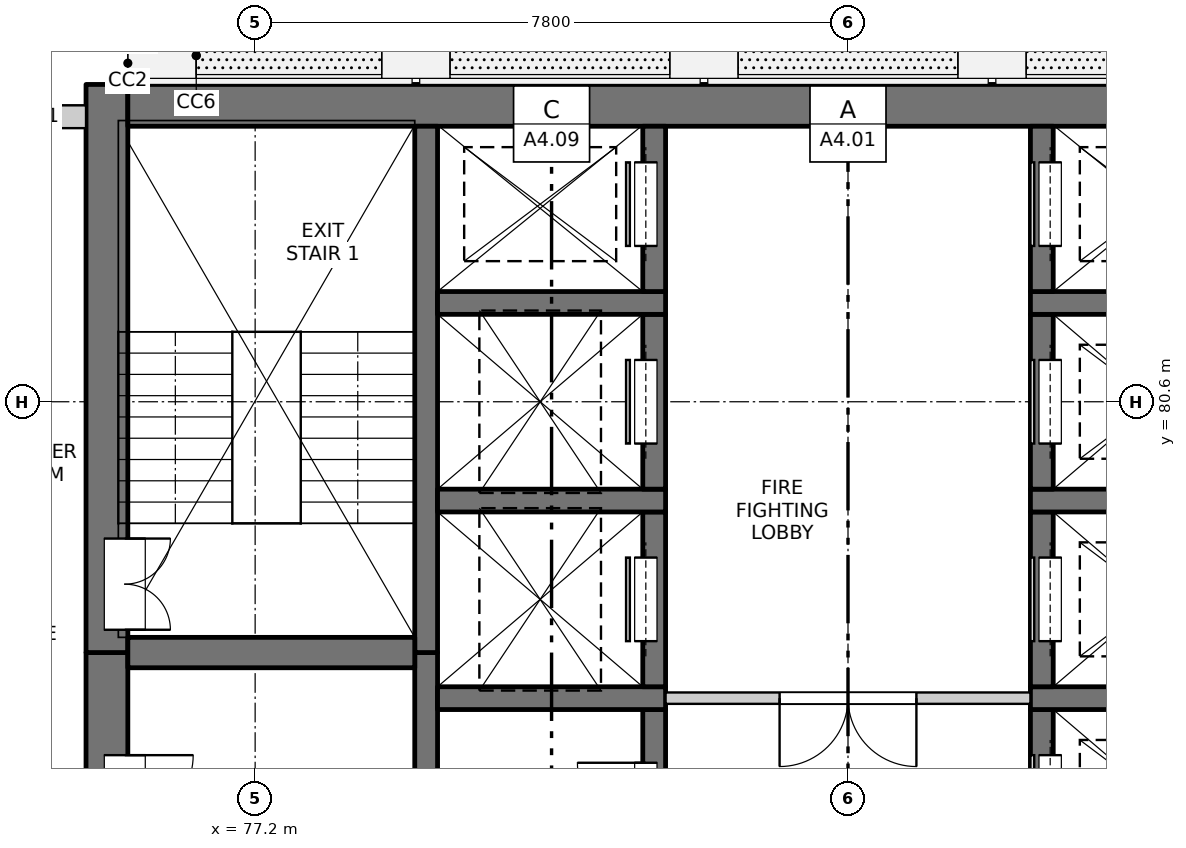
"""IFC4 building model, lengths in metres.
Left out: names, types, materials, properties, quantities, classifications, styles, units other than length and angle.
Written with IfcOpenShell. Run it as: python <this file> out.ifc"""

import sys

from ifc_helpers import new_model, si_unit, direction, frame, frame_2d, origin, place, context, subcontext, project, spatial, rectangle, extrude, element, fill, save


model = new_model("IFC4")
c1 = context("Model", 3, precision=1e-05, world=origin(), true_north=direction((0.0, 1.0)))
c2 = subcontext(c1, "Body", "Model", "MODEL_VIEW")
j1 = project(units=[si_unit("LENGTHUNIT", "METRE"), si_unit("PLANEANGLEUNIT", "RADIAN")], contexts=[c1])
p1 = place(None, origin())
s1 = spatial("IfcSite", under=j1, at=p1, CompositionType="ELEMENT")
p2 = place(p1, origin())
s2 = spatial("IfcBuilding", under=s1, at=p2, CompositionType="ELEMENT")
p3 = place(p2, frame((0.0, 0.0, 148.6)))
s3 = spatial("IfcBuildingStorey", under=s2, at=p3, CompositionType="ELEMENT", Elevation=148.6)
p4 = place(p3, frame((75.25, 54.975, -0.3), z_axis=(0.0, 0.0, 1.0), x_axis=(0.0, 1.0, 0.0)))
e1 = element("IfcWall", 1, at=p4, inside=s3, PredefinedType="SOLIDWALL", context=c2, shape_type="SweptSolid", body=[
    extrude(rectangle(XDim=22.325, YDim=0.55, at=frame_2d((11.163, 0.0))), origin(), (0.0, 0.0, 1.0), 3.45),
])
p5 = place(p4, frame((7.475, 0.0, 0.3)))
e2 = element("IfcOpeningElement", 2, at=p5, cuts=e1, PredefinedType="OPENING", context=c2, shape_type="SweptSolid", body=[
    extrude(rectangle(XDim=0.9, YDim=2.1, at=frame_2d((0.45, 1.05))), frame((0.0, 0.285, 0.0), z_axis=(0.0, -1.0, 0.0), x_axis=(1.0, 0.0, 0.0)), (0.0, 0.0, 1.0), 0.57),
])
p6 = place(p4, frame((13.775, 0.0, 0.3)))
e3 = element("IfcOpeningElement", 3, at=p6, cuts=e1, PredefinedType="OPENING", context=c2, shape_type="SweptSolid", body=[
    extrude(rectangle(XDim=0.9, YDim=2.1, at=frame_2d((0.45, 1.05))), frame((0.0, 0.285, 0.0), z_axis=(0.0, -1.0, 0.0), x_axis=(1.0, 0.0, 0.0)), (0.0, 0.0, 1.0), 0.57),
])
p7 = place(p4, frame((20.075, 0.0, 0.3)))
e4 = element("IfcOpeningElement", 4, at=p7, cuts=e1, PredefinedType="OPENING", context=c2, shape_type="SweptSolid", body=[
    extrude(rectangle(XDim=0.9, YDim=2.1, at=frame_2d((0.45, 1.05))), frame((0.0, 0.285, 0.0), z_axis=(0.0, -1.0, 0.0), x_axis=(1.0, 0.0, 0.0)), (0.0, 0.0, 1.0), 0.57),
])
p8 = place(p3, frame((75.25, 77.3, -0.3), z_axis=(0.0, 0.0, 1.0), x_axis=(0.0, 1.0, 0.0)))
e5 = element("IfcWall", 5, at=p8, inside=s3, PredefinedType="SOLIDWALL", context=c2, shape_type="SweptSolid", body=[
    extrude(rectangle(XDim=7.475, YDim=0.55, at=frame_2d((3.737, 0.0))), origin(), (0.0, 0.0, 1.0), 3.45),
])
p9 = place(p8, frame((0.3, 0.0, 0.3)))
e6 = element("IfcOpeningElement", 6, at=p9, cuts=e5, PredefinedType="OPENING", context=c2, shape_type="SweptSolid", body=[
    extrude(rectangle(XDim=1.2, YDim=2.1, at=frame_2d((0.6, 1.05))), frame((0.0, 0.285, 0.0), z_axis=(0.0, -1.0, 0.0), x_axis=(1.0, 0.0, 0.0)), (0.0, 0.0, 1.0), 0.57),
])
p10 = place(p3, frame((75.525, 84.5, -0.3), z_axis=(0.0, 0.0, 1.0), x_axis=(1.0, 0.0, 0.0)))
e7 = element("IfcWall", 7, at=p10, inside=s3, PredefinedType="SOLIDWALL", context=c2, shape_type="SweptSolid", body=[
    extrude(rectangle(XDim=18.95, YDim=0.55, at=frame_2d((9.475, 0.0))), origin(), (0.0, 0.0, 1.0), 3.45),
])
p11 = place(p3, frame((79.45, 60.95, -0.3), z_axis=(0.0, 0.0, 1.0), x_axis=(0.0, 1.0, 0.0)))
e8 = element("IfcWall", 8, at=p11, inside=s3, PredefinedType="SOLIDWALL", context=c2, shape_type="SweptSolid", body=[
    extrude(rectangle(XDim=16.35, YDim=0.3, at=frame_2d((8.175, 0.0))), origin(), (0.0, 0.0, 1.0), 3.45),
])
p12 = place(p3, frame((79.45, 77.3, -0.3), z_axis=(0.0, 0.0, 1.0), x_axis=(0.0, 1.0, 0.0)))
e9 = element("IfcWall", 9, at=p12, inside=s3, PredefinedType="SOLIDWALL", context=c2, shape_type="SweptSolid", body=[
    extrude(rectangle(XDim=6.925, YDim=0.3, at=frame_2d((3.462, 0.0))), origin(), (0.0, 0.0, 1.0), 3.45),
])
p13 = place(p3, frame((82.45, 74.25, -0.3), z_axis=(0.0, 0.0, 1.0), x_axis=(0.0, 1.0, 0.0)))
e10 = element("IfcWall", 10, at=p13, inside=s3, PredefinedType="SOLIDWALL", context=c2, shape_type="SweptSolid", body=[
    extrude(rectangle(XDim=2.3, YDim=0.3, at=frame_2d((1.15, 0.0))), origin(), (0.0, 0.0, 1.0), 3.45),
])
p14 = place(p13, frame((0.7, 0.0, 0.3)))
e11 = element("IfcOpeningElement", 11, at=p14, cuts=e10, PredefinedType="OPENING", context=c2, shape_type="SweptSolid", body=[
    extrude(rectangle(XDim=0.9, YDim=2.1, at=frame_2d((0.45, 1.05))), frame((0.0, 0.16, 0.0), z_axis=(0.0, -1.0, 0.0), x_axis=(1.0, 0.0, 0.0)), (0.0, 0.0, 1.0), 0.32),
])
p15 = place(p3, frame((79.6, 76.7, -0.3), z_axis=(0.0, 0.0, 1.0), x_axis=(1.0, 0.0, 0.0)))
e12 = element("IfcWall", 12, at=p15, inside=s3, PredefinedType="SOLIDWALL", context=c2, shape_type="SweptSolid", body=[
    extrude(rectangle(XDim=3.0, YDim=0.3, at=frame_2d((1.5, 0.0))), origin(), (0.0, 0.0, 1.0), 3.45),
])
p16 = place(p3, frame((82.45, 76.85, -0.3), z_axis=(0.0, 0.0, 1.0), x_axis=(0.0, 1.0, 0.0)))
e13 = element("IfcWall", 13, at=p16, inside=s3, PredefinedType="SOLIDWALL", context=c2, shape_type="SweptSolid", body=[
    extrude(rectangle(XDim=2.3, YDim=0.3, at=frame_2d((1.15, 0.0))), origin(), (0.0, 0.0, 1.0), 3.45),
])
p17 = place(p16, frame((0.6, 0.0, 0.3)))
e14 = element("IfcOpeningElement", 14, at=p17, cuts=e13, PredefinedType="OPENING", context=c2, shape_type="SweptSolid", body=[
    extrude(rectangle(XDim=1.1, YDim=2.1, at=frame_2d((0.55, 1.05))), frame((0.0, 0.16, 0.0), z_axis=(0.0, -1.0, 0.0), x_axis=(1.0, 0.0, 0.0)), (0.0, 0.0, 1.0), 0.32),
])
p18 = place(p3, frame((79.6, 79.3, -0.3), z_axis=(0.0, 0.0, 1.0), x_axis=(1.0, 0.0, 0.0)))
e15 = element("IfcWall", 15, at=p18, inside=s3, PredefinedType="SOLIDWALL", context=c2, shape_type="SweptSolid", body=[
    extrude(rectangle(XDim=3.0, YDim=0.3, at=frame_2d((1.5, 0.0))), origin(), (0.0, 0.0, 1.0), 3.45),
])
p19 = place(p3, frame((82.45, 79.45, -0.3), z_axis=(0.0, 0.0, 1.0), x_axis=(0.0, 1.0, 0.0)))
e16 = element("IfcWall", 16, at=p19, inside=s3, PredefinedType="SOLIDWALL", context=c2, shape_type="SweptSolid", body=[
    extrude(rectangle(XDim=2.3, YDim=0.3, at=frame_2d((1.15, 0.0))), origin(), (0.0, 0.0, 1.0), 3.45),
])
p20 = place(p19, frame((0.6, 0.0, 0.3)))
e17 = element("IfcOpeningElement", 17, at=p20, cuts=e16, PredefinedType="OPENING", context=c2, shape_type="SweptSolid", body=[
    extrude(rectangle(XDim=1.1, YDim=2.1, at=frame_2d((0.55, 1.05))), frame((0.0, 0.16, 0.0), z_axis=(0.0, -1.0, 0.0), x_axis=(1.0, 0.0, 0.0)), (0.0, 0.0, 1.0), 0.32),
])
p21 = place(p3, frame((79.6, 81.9, -0.3), z_axis=(0.0, 0.0, 1.0), x_axis=(1.0, 0.0, 0.0)))
e18 = element("IfcWall", 18, at=p21, inside=s3, PredefinedType="SOLIDWALL", context=c2, shape_type="SweptSolid", body=[
    extrude(rectangle(XDim=3.0, YDim=0.3, at=frame_2d((1.5, 0.0))), origin(), (0.0, 0.0, 1.0), 3.45),
])
p22 = place(p3, frame((82.45, 82.05, -0.3), z_axis=(0.0, 0.0, 1.0), x_axis=(0.0, 1.0, 0.0)))
e19 = element("IfcWall", 19, at=p22, inside=s3, PredefinedType="SOLIDWALL", context=c2, shape_type="SweptSolid", body=[
    extrude(rectangle(XDim=2.175, YDim=0.3, at=frame_2d((1.087, 0.0))), origin(), (0.0, 0.0, 1.0), 3.45),
])
p23 = place(p22, frame((0.6, 0.0, 0.3)))
e20 = element("IfcOpeningElement", 20, at=p23, cuts=e19, PredefinedType="OPENING", context=c2, shape_type="SweptSolid", body=[
    extrude(rectangle(XDim=1.1, YDim=2.1, at=frame_2d((0.55, 1.05))), frame((0.0, 0.16, 0.0), z_axis=(0.0, -1.0, 0.0), x_axis=(1.0, 0.0, 0.0)), (0.0, 0.0, 1.0), 0.32),
])
p24 = place(p3, frame((87.55, 74.25, -0.3), z_axis=(0.0, 0.0, 1.0), x_axis=(0.0, 1.0, 0.0)))
e21 = element("IfcWall", 21, at=p24, inside=s3, PredefinedType="SOLIDWALL", context=c2, shape_type="SweptSolid", body=[
    extrude(rectangle(XDim=2.3, YDim=0.3, at=frame_2d((1.15, 0.0))), origin(), (0.0, 0.0, 1.0), 3.45),
])
p25 = place(p24, frame((0.6, 0.0, 0.3)))
e22 = element("IfcOpeningElement", 22, at=p25, cuts=e21, PredefinedType="OPENING", context=c2, shape_type="SweptSolid", body=[
    extrude(rectangle(XDim=1.1, YDim=2.1, at=frame_2d((0.55, 1.05))), frame((0.0, 0.16, 0.0), z_axis=(0.0, -1.0, 0.0), x_axis=(1.0, 0.0, 0.0)), (0.0, 0.0, 1.0), 0.32),
])
p26 = place(p3, frame((87.4, 76.7, -0.3), z_axis=(0.0, 0.0, 1.0), x_axis=(1.0, 0.0, 0.0)))
e23 = element("IfcWall", 23, at=p26, inside=s3, PredefinedType="SOLIDWALL", context=c2, shape_type="SweptSolid", body=[
    extrude(rectangle(XDim=3.0, YDim=0.3, at=frame_2d((1.5, 0.0))), origin(), (0.0, 0.0, 1.0), 3.45),
])
p27 = place(p3, frame((87.55, 76.85, -0.3), z_axis=(0.0, 0.0, 1.0), x_axis=(0.0, 1.0, 0.0)))
e24 = element("IfcWall", 24, at=p27, inside=s3, PredefinedType="SOLIDWALL", context=c2, shape_type="SweptSolid", body=[
    extrude(rectangle(XDim=2.3, YDim=0.3, at=frame_2d((1.15, 0.0))), origin(), (0.0, 0.0, 1.0), 3.45),
])
p28 = place(p27, frame((0.6, 0.0, 0.3)))
e25 = element("IfcOpeningElement", 25, at=p28, cuts=e24, PredefinedType="OPENING", context=c2, shape_type="SweptSolid", body=[
    extrude(rectangle(XDim=1.1, YDim=2.1, at=frame_2d((0.55, 1.05))), frame((0.0, 0.16, 0.0), z_axis=(0.0, -1.0, 0.0), x_axis=(1.0, 0.0, 0.0)), (0.0, 0.0, 1.0), 0.32),
])
p29 = place(p3, frame((87.4, 79.3, -0.3), z_axis=(0.0, 0.0, 1.0), x_axis=(1.0, 0.0, 0.0)))
e26 = element("IfcWall", 26, at=p29, inside=s3, PredefinedType="SOLIDWALL", context=c2, shape_type="SweptSolid", body=[
    extrude(rectangle(XDim=3.0, YDim=0.3, at=frame_2d((1.5, 0.0))), origin(), (0.0, 0.0, 1.0), 3.45),
])
p30 = place(p3, frame((87.55, 79.45, -0.3), z_axis=(0.0, 0.0, 1.0), x_axis=(0.0, 1.0, 0.0)))
e27 = element("IfcWall", 27, at=p30, inside=s3, PredefinedType="SOLIDWALL", context=c2, shape_type="SweptSolid", body=[
    extrude(rectangle(XDim=2.3, YDim=0.3, at=frame_2d((1.15, 0.0))), origin(), (0.0, 0.0, 1.0), 3.45),
])
p31 = place(p30, frame((0.6, 0.0, 0.3)))
e28 = element("IfcOpeningElement", 28, at=p31, cuts=e27, PredefinedType="OPENING", context=c2, shape_type="SweptSolid", body=[
    extrude(rectangle(XDim=1.1, YDim=2.1, at=frame_2d((0.55, 1.05))), frame((0.0, 0.16, 0.0), z_axis=(0.0, -1.0, 0.0), x_axis=(1.0, 0.0, 0.0)), (0.0, 0.0, 1.0), 0.32),
])
p32 = place(p3, frame((87.4, 81.9, -0.3), z_axis=(0.0, 0.0, 1.0), x_axis=(1.0, 0.0, 0.0)))
e29 = element("IfcWall", 29, at=p32, inside=s3, PredefinedType="SOLIDWALL", context=c2, shape_type="SweptSolid", body=[
    extrude(rectangle(XDim=3.0, YDim=0.3, at=frame_2d((1.5, 0.0))), origin(), (0.0, 0.0, 1.0), 3.45),
])
p33 = place(p3, frame((87.55, 82.05, -0.3), z_axis=(0.0, 0.0, 1.0), x_axis=(0.0, 1.0, 0.0)))
e30 = element("IfcWall", 30, at=p33, inside=s3, PredefinedType="SOLIDWALL", context=c2, shape_type="SweptSolid", body=[
    extrude(rectangle(XDim=2.175, YDim=0.3, at=frame_2d((1.087, 0.0))), origin(), (0.0, 0.0, 1.0), 3.45),
])
p34 = place(p33, frame((0.6, 0.0, 0.3)))
e31 = element("IfcOpeningElement", 31, at=p34, cuts=e30, PredefinedType="OPENING", context=c2, shape_type="SweptSolid", body=[
    extrude(rectangle(XDim=1.1, YDim=2.1, at=frame_2d((0.55, 1.05))), frame((0.0, 0.16, 0.0), z_axis=(0.0, -1.0, 0.0), x_axis=(1.0, 0.0, 0.0)), (0.0, 0.0, 1.0), 0.32),
])
p35 = place(p3, frame((75.525, 77.3, -0.3), z_axis=(0.0, 0.0, 1.0), x_axis=(1.0, 0.0, 0.0)))
e32 = element("IfcWall", 32, at=p35, inside=s3, PredefinedType="SOLIDWALL", context=c2, shape_type="SweptSolid", body=[
    extrude(rectangle(XDim=3.775, YDim=0.4, at=frame_2d((1.888, 0.0))), origin(), (0.0, 0.0, 1.0), 3.45),
])
p36 = place(p3, frame((73.675, 84.35, 0.0), z_axis=(0.0, 0.0, 1.0), x_axis=(1.0, 0.0, 0.0)))
e33 = element("IfcWall", 33, at=p36, inside=s3, PredefinedType="SOLIDWALL", context=c2, shape_type="SweptSolid", body=[
    extrude(rectangle(XDim=1.3, YDim=0.3, at=frame_2d((0.65, 0.0))), origin(), (0.0, 0.0, 1.0), 2.7),
])
p37 = place(p3, frame((82.6, 76.7, 0.0), z_axis=(0.0, 0.0, 1.0), x_axis=(1.0, 0.0, 0.0)))
e34 = element("IfcWall", 34, at=p37, inside=s3, PredefinedType="PARTITIONING", context=c2, shape_type="SweptSolid", body=[
    extrude(rectangle(XDim=4.8, YDim=0.15, at=frame_2d((2.4, 0.0))), origin(), (0.0, 0.0, 1.0), 3.15),
])
p38 = place(p37, frame((1.5, 0.0, 0.0)))
e35 = element("IfcOpeningElement", 35, at=p38, cuts=e34, PredefinedType="OPENING", context=c2, shape_type="SweptSolid", body=[
    extrude(rectangle(XDim=1.8, YDim=2.1, at=frame_2d((0.9, 1.05))), frame((0.0, 0.085, 0.0), z_axis=(0.0, -1.0, 0.0), x_axis=(1.0, 0.0, 0.0)), (0.0, 0.0, 1.0), 0.17),
])
p39 = place(p14, origin())
e36 = element("IfcDoor", 36, at=p39, inside=s3, OperationType="SINGLE_SWING_RIGHT", PredefinedType="DOOR", context=c2, shape_type="SweptSolid", body=[
    extrude(rectangle(XDim=0.9, YDim=2.1, at=frame_2d((0.45, 1.05))), frame((0.0, 0.135, 0.0), z_axis=(0.0, -1.0, 0.0), x_axis=(1.0, 0.0, 0.0)), (0.0, 0.0, 1.0), 0.05),
])
fill(e11, e36)
p40 = place(p25, origin())
e37 = element("IfcDoor", 37, at=p40, inside=s3, OperationType="SLIDING_TO_LEFT", PredefinedType="DOOR", context=c2, shape_type="SweptSolid", body=[
    extrude(rectangle(XDim=1.1, YDim=2.1, at=frame_2d((0.55, 1.05))), frame((0.0, -0.085, 0.0), z_axis=(0.0, -1.0, 0.0), x_axis=(1.0, 0.0, 0.0)), (0.0, 0.0, 1.0), 0.05),
])
fill(e22, e37)
p41 = place(p7, origin())
e38 = element("IfcDoor", 38, at=p41, inside=s3, OperationType="SINGLE_SWING_LEFT", PredefinedType="DOOR", context=c2, shape_type="SweptSolid", body=[
    extrude(rectangle(XDim=0.9, YDim=2.1, at=frame_2d((0.45, 1.05))), frame((0.0, -0.21, 0.0), z_axis=(0.0, -1.0, 0.0), x_axis=(1.0, 0.0, 0.0)), (0.0, 0.0, 1.0), 0.05),
])
fill(e4, e38)
p42 = place(p38, origin())
e39 = element("IfcDoor", 39, at=p42, inside=s3, OperationType="DOUBLE_DOOR_SINGLE_SWING", PredefinedType="DOOR", context=c2, shape_type="SweptSolid", body=[
    extrude(rectangle(XDim=1.8, YDim=2.1, at=frame_2d((0.9, 1.05))), frame((0.0, 0.025, 0.0), z_axis=(0.0, -1.0, 0.0), x_axis=(1.0, 0.0, 0.0)), (0.0, 0.0, 1.0), 0.05),
])
fill(e35, e39)
p43 = place(p17, origin())
e40 = element("IfcDoor", 40, at=p43, inside=s3, OperationType="SLIDING_TO_LEFT", PredefinedType="DOOR", context=c2, shape_type="SweptSolid", body=[
    extrude(rectangle(XDim=1.1, YDim=2.1, at=frame_2d((0.55, 1.05))), frame((0.0, 0.135, 0.0), z_axis=(0.0, -1.0, 0.0), x_axis=(1.0, 0.0, 0.0)), (0.0, 0.0, 1.0), 0.05),
])
fill(e14, e40)
p44 = place(p28, origin())
e41 = element("IfcDoor", 41, at=p44, inside=s3, OperationType="SLIDING_TO_LEFT", PredefinedType="DOOR", context=c2, shape_type="SweptSolid", body=[
    extrude(rectangle(XDim=1.1, YDim=2.1, at=frame_2d((0.55, 1.05))), frame((0.0, -0.085, 0.0), z_axis=(0.0, -1.0, 0.0), x_axis=(1.0, 0.0, 0.0)), (0.0, 0.0, 1.0), 0.05),
])
fill(e25, e41)
p45 = place(p9, origin())
e42 = element("IfcDoor", 42, at=p45, inside=s3, OperationType="DOUBLE_DOOR_SINGLE_SWING", PredefinedType="DOOR", context=c2, shape_type="SweptSolid", body=[
    extrude(rectangle(XDim=1.2, YDim=2.1, at=frame_2d((0.6, 1.05))), frame((0.0, -0.21, 0.0), z_axis=(0.0, -1.0, 0.0), x_axis=(1.0, 0.0, 0.0)), (0.0, 0.0, 1.0), 0.05),
])
fill(e6, e42)
p46 = place(p20, origin())
e43 = element("IfcDoor", 43, at=p46, inside=s3, OperationType="SLIDING_TO_LEFT", PredefinedType="DOOR", context=c2, shape_type="SweptSolid", body=[
    extrude(rectangle(XDim=1.1, YDim=2.1, at=frame_2d((0.55, 1.05))), frame((0.0, 0.135, 0.0), z_axis=(0.0, -1.0, 0.0), x_axis=(1.0, 0.0, 0.0)), (0.0, 0.0, 1.0), 0.05),
])
fill(e17, e43)
p47 = place(p31, origin())
e44 = element("IfcDoor", 44, at=p47, inside=s3, OperationType="SLIDING_TO_RIGHT", PredefinedType="DOOR", context=c2, shape_type="SweptSolid", body=[
    extrude(rectangle(XDim=1.1, YDim=2.1, at=frame_2d((0.55, 1.05))), frame((0.0, -0.085, 0.0), z_axis=(0.0, -1.0, 0.0), x_axis=(1.0, 0.0, 0.0)), (0.0, 0.0, 1.0), 0.05),
])
fill(e28, e44)
p48 = place(p23, origin())
e45 = element("IfcDoor", 45, at=p48, inside=s3, OperationType="SLIDING_TO_RIGHT", PredefinedType="DOOR", context=c2, shape_type="SweptSolid", body=[
    extrude(rectangle(XDim=1.1, YDim=2.1, at=frame_2d((0.55, 1.05))), frame((0.0, 0.135, 0.0), z_axis=(0.0, -1.0, 0.0), x_axis=(1.0, 0.0, 0.0)), (0.0, 0.0, 1.0), 0.05),
])
fill(e20, e45)
p49 = place(p34, origin())
e46 = element("IfcDoor", 46, at=p49, inside=s3, OperationType="SLIDING_TO_RIGHT", PredefinedType="DOOR", context=c2, shape_type="SweptSolid", body=[
    extrude(rectangle(XDim=1.1, YDim=2.1, at=frame_2d((0.55, 1.05))), frame((0.0, -0.085, 0.0), z_axis=(0.0, -1.0, 0.0), x_axis=(1.0, 0.0, 0.0)), (0.0, 0.0, 1.0), 0.05),
])
fill(e31, e46)
save(model, sys.argv[1])
